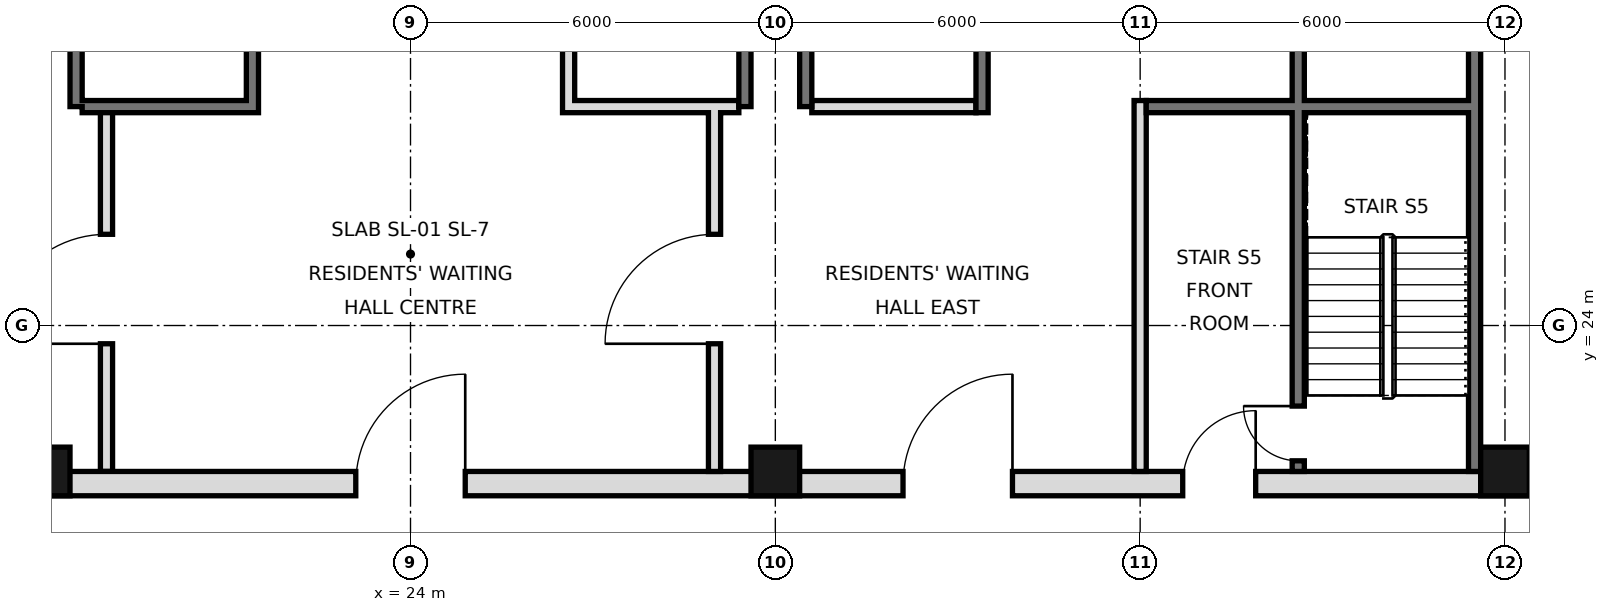
"""IFC4 building model, lengths in metres.
Left out: names, types, materials, properties, quantities, classifications, styles, units other than length and angle.
Written with IfcOpenShell. Run it as: python <this file> out.ifc"""

import sys

from ifc_helpers import new_model, si_unit, direction, frame, frame_2d, origin, origin_2d, place, context, subcontext, project, spatial, rectangle, hollow_rectangle, extrude, element, fill, save


model = new_model("IFC4")
c1 = context("Model", 3, precision=1e-05, world=origin(), true_north=direction((0.0, 1.0)))
c2 = subcontext(c1, "Body", "Model", "MODEL_VIEW")
j1 = project(units=[si_unit("LENGTHUNIT", "METRE"), si_unit("PLANEANGLEUNIT", "RADIAN")], contexts=[c1])
p1 = place(None, origin())
s1 = spatial("IfcSite", under=j1, at=p1, CompositionType="ELEMENT")
p2 = place(p1, origin())
s2 = spatial("IfcBuilding", under=s1, at=p2, CompositionType="ELEMENT")
p3 = place(p2, frame((0.0, 0.0, 57.0)))
s3 = spatial("IfcBuildingStorey", under=s2, at=p3, CompositionType="ELEMENT", Elevation=57.0)
for number, where, z_axis, x_axis in (
    (1, (18.0, 21.6, 0.0), (0.0, 0.0, 1.0), (1.0, 0.0, 0.0)),
    (2, (30.0, 21.6, 0.0), (0.0, 0.0, 1.0), (1.0, 0.0, 0.0)),
    (3, (42.0, 21.6, 0.0), (0.0, 0.0, 1.0), (1.0, 0.0, 0.0)),
):
    element("IfcColumn", number, at=place(p3, frame(where, z_axis=z_axis, x_axis=x_axis)), inside=s3, PredefinedType="COLUMN", context=c2, shape_type="SweptSolid", body=[
        extrude(hollow_rectangle(XDim=0.8, YDim=0.8, WallThickness=0.06, at=origin_2d()), origin(), (0.0, 0.0, 1.0), 3.6),
    ])
p4 = place(p3, frame((41.5, 21.6, 0.0), z_axis=(0.0, 0.0, 1.0), x_axis=(0.0, 1.0, 0.0)))
e4 = element("IfcWall", 4, at=p4, inside=s3, PredefinedType="SOLIDWALL", context=c2, shape_type="SweptSolid", body=[
    extrude(rectangle(XDim=23.5, YDim=0.2, at=frame_2d((11.75, 0.0))), origin(), (0.0, 0.0, 1.0), 3.42),
])
for number, where, z_axis, x_axis in (
    (5, (18.5, 27.6, 0.0), (0.0, 0.0, 1.0), (0.0, 1.0, 0.0)),
    (6, (29.5, 27.6, 0.0), (0.0, 0.0, 1.0), (0.0, 1.0, 0.0)),
    (7, (30.5, 27.6, 0.0), (0.0, 0.0, 1.0), (0.0, 1.0, 0.0)),
):
    element("IfcWall", number, at=place(p3, frame(where, z_axis=z_axis, x_axis=x_axis)), inside=s3, PredefinedType="SOLIDWALL", context=c2, shape_type="SweptSolid", body=[
        extrude(rectangle(XDim=17.5, YDim=0.2, at=frame_2d((8.75, 0.0))), origin(), (0.0, 0.0, 1.0), 3.42),
    ])
p5 = place(p3, frame((5.6, 21.4, 0.0), z_axis=(0.0, 0.0, 1.0), x_axis=(1.0, 0.0, 0.0)))
e8 = element("IfcWall", 8, at=p5, inside=s3, PredefinedType="SOLIDWALL", context=c2, shape_type="SweptSolid", body=[
    extrude(rectangle(XDim=36.8, YDim=0.4, at=frame_2d((18.4, 0.0))), origin(), (0.0, 0.0, 1.0), 3.42),
])
p6 = place(p5, frame((8.5, 0.0, 0.0)))
e9 = element("IfcOpeningElement", 9, at=p6, cuts=e8, PredefinedType="OPENING", context=c2, shape_type="SweptSolid", body=[
    extrude(rectangle(XDim=1.8, YDim=2.1, at=frame_2d((0.9, 1.05))), frame((0.0, 0.21, 0.0), z_axis=(0.0, -1.0, 0.0), x_axis=(1.0, 0.0, 0.0)), (0.0, 0.0, 1.0), 0.42),
])
p7 = place(p5, frame((17.5, 0.0, 0.0)))
e10 = element("IfcOpeningElement", 10, at=p7, cuts=e8, PredefinedType="OPENING", context=c2, shape_type="SweptSolid", body=[
    extrude(rectangle(XDim=1.8, YDim=2.1, at=frame_2d((0.9, 1.05))), frame((0.0, 0.21, 0.0), z_axis=(0.0, -1.0, 0.0), x_axis=(1.0, 0.0, 0.0)), (0.0, 0.0, 1.0), 0.42),
])
p8 = place(p5, frame((26.5, 0.0, 0.0)))
e11 = element("IfcOpeningElement", 11, at=p8, cuts=e8, PredefinedType="OPENING", context=c2, shape_type="SweptSolid", body=[
    extrude(rectangle(XDim=1.8, YDim=2.1, at=frame_2d((0.9, 1.05))), frame((0.0, 0.21, 0.0), z_axis=(0.0, -1.0, 0.0), x_axis=(1.0, 0.0, 0.0)), (0.0, 0.0, 1.0), 0.42),
])
p9 = place(p5, frame((4.5, 0.0, 0.0)))
e12 = element("IfcOpeningElement", 12, at=p9, cuts=e8, PredefinedType="OPENING", context=c2, shape_type="SweptSolid", body=[
    extrude(rectangle(XDim=1.2, YDim=2.1, at=frame_2d((0.6, 1.05))), frame((0.0, 0.21, 0.0), z_axis=(0.0, -1.0, 0.0), x_axis=(1.0, 0.0, 0.0)), (0.0, 0.0, 1.0), 0.42),
])
p10 = place(p5, frame((31.1, 0.0, 0.0)))
e13 = element("IfcOpeningElement", 13, at=p10, cuts=e8, PredefinedType="OPENING", context=c2, shape_type="SweptSolid", body=[
    extrude(rectangle(XDim=1.2, YDim=2.1, at=frame_2d((0.6, 1.05))), frame((0.0, 0.21, 0.0), z_axis=(0.0, -1.0, 0.0), x_axis=(1.0, 0.0, 0.0)), (0.0, 0.0, 1.0), 0.42),
])
p11 = place(p3, frame((19.0, 21.6, 0.0), z_axis=(0.0, 0.0, 1.0), x_axis=(0.0, 1.0, 0.0)))
e14 = element("IfcWall", 14, at=p11, inside=s3, PredefinedType="PARTITIONING", context=c2, shape_type="SweptSolid", body=[
    extrude(rectangle(XDim=6.0, YDim=0.2, at=frame_2d((3.0, 0.0))), origin(), (0.0, 0.0, 1.0), 3.42),
])
p12 = place(p11, frame((2.1, 0.0, 0.0)))
e15 = element("IfcOpeningElement", 15, at=p12, cuts=e14, PredefinedType="OPENING", context=c2, shape_type="SweptSolid", body=[
    extrude(rectangle(XDim=1.8, YDim=2.1, at=frame_2d((0.9, 1.05))), frame((0.0, 0.11, 0.0), z_axis=(0.0, -1.0, 0.0), x_axis=(1.0, 0.0, 0.0)), (0.0, 0.0, 1.0), 0.22),
])
p13 = place(p3, frame((29.0, 21.6, 0.0), z_axis=(0.0, 0.0, 1.0), x_axis=(0.0, 1.0, 0.0)))
e16 = element("IfcWall", 16, at=p13, inside=s3, PredefinedType="PARTITIONING", context=c2, shape_type="SweptSolid", body=[
    extrude(rectangle(XDim=6.0, YDim=0.2, at=frame_2d((3.0, 0.0))), origin(), (0.0, 0.0, 1.0), 3.42),
])
p14 = place(p13, frame((2.1, 0.0, 0.0)))
e17 = element("IfcOpeningElement", 17, at=p14, cuts=e16, PredefinedType="OPENING", context=c2, shape_type="SweptSolid", body=[
    extrude(rectangle(XDim=1.8, YDim=2.1, at=frame_2d((0.9, 1.05))), frame((0.0, 0.11, 0.0), z_axis=(0.0, -1.0, 0.0), x_axis=(1.0, 0.0, 0.0)), (0.0, 0.0, 1.0), 0.22),
])
p15 = place(p3, frame((21.4, 27.5, 0.0), z_axis=(0.0, 0.0, 1.0), x_axis=(0.0, 1.0, 0.0)))
e18 = element("IfcWall", 18, at=p15, inside=s3, PredefinedType="SOLIDWALL", context=c2, shape_type="SweptSolid", body=[
    extrude(rectangle(XDim=17.5, YDim=0.2, at=frame_2d((8.75, 0.0))), origin(), (0.0, 0.0, 1.0), 3.42),
])
p16 = place(p15, frame((9.8, 0.0, 0.0)))
e19 = element("IfcOpeningElement", 19, at=p16, cuts=e18, PredefinedType="OPENING", context=c2, shape_type="SweptSolid", body=[
    extrude(rectangle(XDim=1.0, YDim=2.1, at=frame_2d((0.5, 1.05))), frame((0.0, 0.11, 0.0), z_axis=(0.0, -1.0, 0.0), x_axis=(1.0, 0.0, 0.0)), (0.0, 0.0, 1.0), 0.22),
])
p17 = place(p15, frame((7.4, 0.0, 0.0)))
e20 = element("IfcOpeningElement", 20, at=p17, cuts=e18, PredefinedType="OPENING", context=c2, shape_type="SweptSolid", body=[
    extrude(rectangle(XDim=0.9, YDim=2.1, at=frame_2d((0.45, 1.05))), frame((0.0, 0.11, 0.0), z_axis=(0.0, -1.0, 0.0), x_axis=(1.0, 0.0, 0.0)), (0.0, 0.0, 1.0), 0.22),
])
p18 = place(p3, frame((26.6, 27.5, 0.0), z_axis=(0.0, 0.0, 1.0), x_axis=(0.0, 1.0, 0.0)))
e21 = element("IfcWall", 21, at=p18, inside=s3, PredefinedType="SOLIDWALL", context=c2, shape_type="SweptSolid", body=[
    extrude(rectangle(XDim=17.5, YDim=0.2, at=frame_2d((8.75, 0.0))), origin(), (0.0, 0.0, 1.0), 3.42),
])
p19 = place(p18, frame((4.3, 0.0, 0.0)))
e22 = element("IfcOpeningElement", 22, at=p19, cuts=e21, PredefinedType="OPENING", context=c2, shape_type="SweptSolid", body=[
    extrude(rectangle(XDim=0.9, YDim=2.1, at=frame_2d((0.45, 1.05))), frame((0.0, 0.11, 0.0), z_axis=(0.0, -1.0, 0.0), x_axis=(1.0, 0.0, 0.0)), (0.0, 0.0, 1.0), 0.22),
])
p20 = place(p18, frame((10.35, 0.0, 0.0)))
e23 = element("IfcOpeningElement", 23, at=p20, cuts=e21, PredefinedType="OPENING", context=c2, shape_type="SweptSolid", body=[
    extrude(rectangle(XDim=1.0, YDim=2.1, at=frame_2d((0.5, 1.05))), frame((0.0, 0.11, 0.0), z_axis=(0.0, -1.0, 0.0), x_axis=(1.0, 0.0, 0.0)), (0.0, 0.0, 1.0), 0.22),
])
p21 = place(p18, frame((15.475, 0.0, 0.0)))
e24 = element("IfcOpeningElement", 24, at=p21, cuts=e21, PredefinedType="OPENING", context=c2, shape_type="SweptSolid", body=[
    extrude(rectangle(XDim=1.0, YDim=2.1, at=frame_2d((0.5, 1.05))), frame((0.0, 0.11, 0.0), z_axis=(0.0, -1.0, 0.0), x_axis=(1.0, 0.0, 0.0)), (0.0, 0.0, 1.0), 0.22),
])
p22 = place(p3, frame((33.4, 27.5, 0.0), z_axis=(0.0, 0.0, 1.0), x_axis=(0.0, 1.0, 0.0)))
e25 = element("IfcWall", 25, at=p22, inside=s3, PredefinedType="SOLIDWALL", context=c2, shape_type="SweptSolid", body=[
    extrude(rectangle(XDim=17.5, YDim=0.2, at=frame_2d((8.75, 0.0))), origin(), (0.0, 0.0, 1.0), 3.42),
])
p23 = place(p22, frame((15.4, 0.0, 0.0)))
e26 = element("IfcOpeningElement", 26, at=p23, cuts=e25, PredefinedType="OPENING", context=c2, shape_type="SweptSolid", body=[
    extrude(rectangle(XDim=1.1, YDim=2.1, at=frame_2d((0.55, 1.05))), frame((0.0, 0.11, 0.0), z_axis=(0.0, -1.0, 0.0), x_axis=(1.0, 0.0, 0.0)), (0.0, 0.0, 1.0), 0.22),
])
p24 = place(p22, frame((2.7, 0.0, 0.0)))
e27 = element("IfcOpeningElement", 27, at=p24, cuts=e25, PredefinedType="OPENING", context=c2, shape_type="SweptSolid", body=[
    extrude(rectangle(XDim=1.0, YDim=2.1, at=frame_2d((0.5, 1.05))), frame((0.0, 0.11, 0.0), z_axis=(0.0, -1.0, 0.0), x_axis=(1.0, 0.0, 0.0)), (0.0, 0.0, 1.0), 0.22),
])
p25 = place(p22, frame((9.9, 0.0, 0.0)))
e28 = element("IfcOpeningElement", 28, at=p25, cuts=e25, PredefinedType="OPENING", context=c2, shape_type="SweptSolid", body=[
    extrude(rectangle(XDim=0.9, YDim=2.1, at=frame_2d((0.45, 1.05))), frame((0.0, 0.11, 0.0), z_axis=(0.0, -1.0, 0.0), x_axis=(1.0, 0.0, 0.0)), (0.0, 0.0, 1.0), 0.22),
])
p26 = place(p3, frame((36.0, 21.6, 0.0), z_axis=(0.0, 0.0, 1.0), x_axis=(0.0, 1.0, 0.0)))
e29 = element("IfcWall", 29, at=p26, inside=s3, PredefinedType="PARTITIONING", context=c2, shape_type="SweptSolid", body=[
    extrude(rectangle(XDim=6.1, YDim=0.2, at=frame_2d((3.05, 0.0))), origin(), (0.0, 0.0, 1.0), 3.42),
])
p27 = place(p3, frame((38.6, 21.6, 0.0), z_axis=(0.0, 0.0, 1.0), x_axis=(0.0, 1.0, 0.0)))
e30 = element("IfcWall", 30, at=p27, inside=s3, PredefinedType="SOLIDWALL", context=c2, shape_type="SweptSolid", body=[
    extrude(rectangle(XDim=23.4, YDim=0.2, at=frame_2d((11.7, 0.0))), origin(), (0.0, 0.0, 1.0), 3.42),
])
p28 = place(p27, frame((8.6, 0.0, 0.0)))
e31 = element("IfcOpeningElement", 31, at=p28, cuts=e30, PredefinedType="OPENING", context=c2, shape_type="SweptSolid", body=[
    extrude(rectangle(XDim=1.0, YDim=2.1, at=frame_2d((0.5, 1.05))), frame((0.0, 0.11, 0.0), z_axis=(0.0, -1.0, 0.0), x_axis=(1.0, 0.0, 0.0)), (0.0, 0.0, 1.0), 0.22),
])
p29 = place(p27, frame((13.25, 0.0, 0.0)))
e32 = element("IfcOpeningElement", 32, at=p29, cuts=e30, PredefinedType="OPENING", context=c2, shape_type="SweptSolid", body=[
    extrude(rectangle(XDim=1.0, YDim=2.1, at=frame_2d((0.5, 1.05))), frame((0.0, 0.11, 0.0), z_axis=(0.0, -1.0, 0.0), x_axis=(1.0, 0.0, 0.0)), (0.0, 0.0, 1.0), 0.22),
])
p30 = place(p27, frame((15.7, 0.0, 0.0)))
e33 = element("IfcOpeningElement", 33, at=p30, cuts=e30, PredefinedType="OPENING", context=c2, shape_type="SweptSolid", body=[
    extrude(rectangle(XDim=1.0, YDim=2.1, at=frame_2d((0.5, 1.05))), frame((0.0, 0.11, 0.0), z_axis=(0.0, -1.0, 0.0), x_axis=(1.0, 0.0, 0.0)), (0.0, 0.0, 1.0), 0.22),
])
p31 = place(p27, frame((0.175, 0.0, 0.0)))
e34 = element("IfcOpeningElement", 34, at=p31, cuts=e30, PredefinedType="OPENING", context=c2, shape_type="SweptSolid", body=[
    extrude(rectangle(XDim=0.9, YDim=2.1, at=frame_2d((0.45, 1.05))), frame((0.0, 0.11, 0.0), z_axis=(0.0, -1.0, 0.0), x_axis=(1.0, 0.0, 0.0)), (0.0, 0.0, 1.0), 0.22),
])
for number, where, z_axis, x_axis in (
    (35, (18.6, 27.6, 0.0), (0.0, 0.0, 1.0), (1.0, 0.0, 0.0)),
    (36, (26.7, 27.6, 0.0), (0.0, 0.0, 1.0), (1.0, 0.0, 0.0)),
):
    element("IfcWall", number, at=place(p3, frame(where, z_axis=z_axis, x_axis=x_axis)), inside=s3, PredefinedType="SOLIDWALL", context=c2, shape_type="SweptSolid", body=[
        extrude(rectangle(XDim=2.7, YDim=0.2, at=frame_2d((1.35, 0.0))), origin(), (0.0, 0.0, 1.0), 3.42),
    ])
p32 = place(p3, frame((30.6, 27.6, 0.0), z_axis=(0.0, 0.0, 1.0), x_axis=(1.0, 0.0, 0.0)))
e37 = element("IfcWall", 37, at=p32, inside=s3, PredefinedType="PARTITIONING", context=c2, shape_type="SweptSolid", body=[
    extrude(rectangle(XDim=2.7, YDim=0.2, at=frame_2d((1.35, 0.0))), origin(), (0.0, 0.0, 1.0), 3.42),
])
p33 = place(p3, frame((36.1, 27.6, 0.0), z_axis=(0.0, 0.0, 1.0), x_axis=(1.0, 0.0, 0.0)))
e38 = element("IfcWall", 38, at=p33, inside=s3, PredefinedType="SOLIDWALL", context=c2, shape_type="SweptSolid", body=[
    extrude(rectangle(XDim=5.3, YDim=0.2, at=frame_2d((2.65, 0.0))), origin(), (0.0, 0.0, 1.0), 3.42),
])
p34 = place(p12, origin())
e39 = element("IfcDoor", 39, at=p34, inside=s3, OperationType="SINGLE_SWING_LEFT", PredefinedType="DOOR", context=c2, shape_type="SweptSolid", body=[
    extrude(rectangle(XDim=1.8, YDim=2.1, at=frame_2d((0.9, 1.05))), frame((0.0, 0.025, 0.0), z_axis=(0.0, -1.0, 0.0), x_axis=(1.0, 0.0, 0.0)), (0.0, 0.0, 1.0), 0.05),
])
fill(e15, e39)
p35 = place(p7, frame((1.8, 0.0, 0.0), z_axis=(0.0, 0.0, 1.0), x_axis=(-1.0, 0.0, 0.0)))
e40 = element("IfcDoor", 40, at=p35, inside=s3, OperationType="SINGLE_SWING_LEFT", PredefinedType="DOOR", context=c2, shape_type="SweptSolid", body=[
    extrude(rectangle(XDim=1.8, YDim=2.1, at=frame_2d((0.9, 1.05))), frame((0.0, 0.025, 0.0), z_axis=(0.0, -1.0, 0.0), x_axis=(1.0, 0.0, 0.0)), (0.0, 0.0, 1.0), 0.05),
])
fill(e10, e40)
p36 = place(p14, origin())
e41 = element("IfcDoor", 41, at=p36, inside=s3, OperationType="SINGLE_SWING_LEFT", PredefinedType="DOOR", context=c2, shape_type="SweptSolid", body=[
    extrude(rectangle(XDim=1.8, YDim=2.1, at=frame_2d((0.9, 1.05))), frame((0.0, 0.025, 0.0), z_axis=(0.0, -1.0, 0.0), x_axis=(1.0, 0.0, 0.0)), (0.0, 0.0, 1.0), 0.05),
])
fill(e17, e41)
p37 = place(p8, frame((1.8, 0.0, 0.0), z_axis=(0.0, 0.0, 1.0), x_axis=(-1.0, 0.0, 0.0)))
e42 = element("IfcDoor", 42, at=p37, inside=s3, OperationType="SINGLE_SWING_LEFT", PredefinedType="DOOR", context=c2, shape_type="SweptSolid", body=[
    extrude(rectangle(XDim=1.8, YDim=2.1, at=frame_2d((0.9, 1.05))), frame((0.0, 0.025, 0.0), z_axis=(0.0, -1.0, 0.0), x_axis=(1.0, 0.0, 0.0)), (0.0, 0.0, 1.0), 0.05),
])
fill(e11, e42)
p38 = place(p10, frame((1.2, 0.0, 0.0), z_axis=(0.0, 0.0, 1.0), x_axis=(-1.0, 0.0, 0.0)))
e43 = element("IfcDoor", 43, at=p38, inside=s3, OperationType="SINGLE_SWING_LEFT", PredefinedType="DOOR", context=c2, shape_type="SweptSolid", body=[
    extrude(rectangle(XDim=1.2, YDim=2.1, at=frame_2d((0.6, 1.05))), frame((0.0, 0.025, 0.0), z_axis=(0.0, -1.0, 0.0), x_axis=(1.0, 0.0, 0.0)), (0.0, 0.0, 1.0), 0.05),
])
fill(e13, e43)
p39 = place(p31, frame((0.9, 0.0, 0.0), z_axis=(0.0, 0.0, 1.0), x_axis=(-1.0, 0.0, 0.0)))
e44 = element("IfcDoor", 44, at=p39, inside=s3, OperationType="SINGLE_SWING_LEFT", PredefinedType="DOOR", context=c2, shape_type="SweptSolid", body=[
    extrude(rectangle(XDim=0.9, YDim=2.1, at=frame_2d((0.45, 1.05))), frame((0.0, 0.025, 0.0), z_axis=(0.0, -1.0, 0.0), x_axis=(1.0, 0.0, 0.0)), (0.0, 0.0, 1.0), 0.05),
])
fill(e34, e44)
save(model, sys.argv[1])
